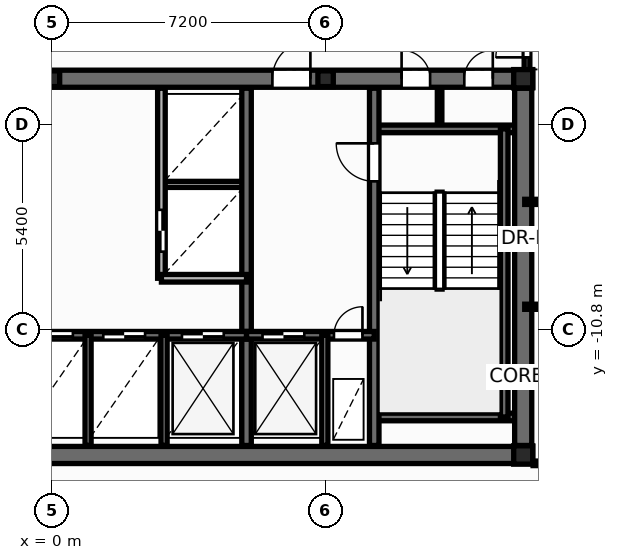
"""IFC4 building model, lengths in metres.
Left out: names, types, materials, properties, quantities, classifications, styles, units other than length and angle.
Written with IfcOpenShell. Run it as: python <this file> out.ifc"""

import sys

from ifc_helpers import new_model, si_unit, direction, frame, frame_2d, origin, origin_2d, place, context, subcontext, project, spatial, rectangle, i_section, extrude, element, fill, save


model = new_model("IFC4")
c1 = context("Model", 3, precision=1e-05, world=origin(), true_north=direction((0.0, 1.0)))
c2 = subcontext(c1, "Body", "Model", "MODEL_VIEW")
j1 = project(units=[si_unit("LENGTHUNIT", "METRE"), si_unit("PLANEANGLEUNIT", "RADIAN")], contexts=[c1])
p1 = place(None, origin())
s1 = spatial("IfcSite", under=j1, at=p1, CompositionType="ELEMENT")
p2 = place(p1, origin())
s2 = spatial("IfcBuilding", under=s1, at=p2, CompositionType="ELEMENT")
p3 = place(p2, frame((0.0, 0.0, 56.7)))
s3 = spatial("IfcBuildingStorey", under=s2, at=p3, CompositionType="ELEMENT", Elevation=56.7)
for number, where, z_axis, x_axis in (
    (1, (12.4, -14.1, 0.0), (0.0, 0.0, 1.0), (1.0, 0.0, 0.0)),
    (2, (12.4, -4.2, 0.0), (0.0, 0.0, 1.0), (1.0, 0.0, 0.0)),
):
    element("IfcColumn", number, at=place(p3, frame(where, z_axis=z_axis, x_axis=x_axis)), inside=s3, PredefinedType="COLUMN", context=c2, shape_type="SweptSolid", body=[
        extrude(i_section(OverallWidth=0.5, OverallDepth=0.482, WebThickness=0.04, FlangeThickness=0.045, at=origin_2d()), origin(), (0.0, 0.0, 1.0), 3.6),
    ])
for number, where, z_axis, x_axis in (
    (3, (0.0, -4.2, 0.0), (0.0, 0.0, 1.0), (1.0, 0.0, 0.0)),
    (4, (7.2, -4.2, 0.0), (0.0, 0.0, 1.0), (1.0, 0.0, 0.0)),
):
    element("IfcColumn", number, at=place(p3, frame(where, z_axis=z_axis, x_axis=x_axis)), inside=s3, PredefinedType="PILASTER", context=c2, shape_type="SweptSolid", body=[
        extrude(i_section(OverallWidth=0.405, OverallDepth=0.414, WebThickness=0.022, FlangeThickness=0.032, at=origin_2d()), origin(), (0.0, 0.0, 1.0), 3.6),
    ])
p4 = place(p3, frame((2.88, -6.98, 0.0), z_axis=(0.0, 0.0, 1.0), x_axis=(1.0, 0.0, 0.0)))
e5 = element("IfcWall", 5, at=p4, inside=s3, PredefinedType="PARTITIONING", context=c2, shape_type="SweptSolid", body=[
    extrude(rectangle(XDim=2.24, YDim=0.16, at=frame_2d((1.12, 0.0))), origin(), (0.0, 0.0, 1.0), 3.32),
])
p5 = place(p3, frame((10.2, -5.52, 0.0), z_axis=(0.0, 0.0, 1.0), x_axis=(0.0, 1.0, 0.0)))
e6 = element("IfcWall", 6, at=p5, inside=s3, PredefinedType="PARTITIONING", context=c2, shape_type="SweptSolid", body=[
    extrude(rectangle(XDim=1.12, YDim=0.12, at=frame_2d((0.56, 0.0))), origin(), (0.0, 0.0, 1.0), 3.32),
])
p6 = place(p3, frame((-12.65, -14.1, 0.0), z_axis=(0.0, 0.0, 1.0), x_axis=(1.0, 0.0, 0.0)))
e7 = element("IfcWall", 7, at=p6, inside=s3, PredefinedType="SHEAR", context=c2, shape_type="SweptSolid", body=[
    extrude(rectangle(XDim=25.3, YDim=0.45, at=frame_2d((12.65, 0.0))), origin(), (0.0, 0.0, 1.0), 3.6),
])
p7 = place(p3, frame((-12.65, -4.2, 0.0), z_axis=(0.0, 0.0, 1.0), x_axis=(1.0, 0.0, 0.0)))
e8 = element("IfcWall", 8, at=p7, inside=s3, PredefinedType="SHEAR", context=c2, shape_type="SweptSolid", body=[
    extrude(rectangle(XDim=25.3, YDim=0.45, at=frame_2d((12.65, 0.0))), origin(), (0.0, 0.0, 1.0), 3.6),
])
p8 = place(p7, frame((0.95, 0.0, 0.0)))
e9 = element("IfcOpeningElement", 9, at=p8, cuts=e8, PredefinedType="OPENING", context=c2, shape_type="SweptSolid", body=[
    extrude(rectangle(XDim=0.756, YDim=2.054, at=frame_2d((0.375, 1.027))), frame((0.0, 0.235, 0.0), z_axis=(0.0, -1.0, 0.0), x_axis=(1.0, 0.0, 0.0)), (0.0, 0.0, 1.0), 0.47),
])
p9 = place(p7, frame((2.6, 0.0, 0.0)))
e10 = element("IfcOpeningElement", 10, at=p9, cuts=e8, PredefinedType="OPENING", context=c2, shape_type="SweptSolid", body=[
    extrude(rectangle(XDim=0.756, YDim=2.054, at=frame_2d((0.375, 1.027))), frame((0.0, 0.235, 0.0), z_axis=(0.0, -1.0, 0.0), x_axis=(1.0, 0.0, 0.0)), (0.0, 0.0, 1.0), 0.47),
])
p10 = place(p7, frame((21.85, 0.0, 0.0)))
e11 = element("IfcOpeningElement", 11, at=p10, cuts=e8, PredefinedType="OPENING", context=c2, shape_type="SweptSolid", body=[
    extrude(rectangle(XDim=0.756, YDim=2.054, at=frame_2d((0.375, 1.027))), frame((0.0, 0.235, 0.0), z_axis=(0.0, -1.0, 0.0), x_axis=(1.0, 0.0, 0.0)), (0.0, 0.0, 1.0), 0.47),
])
p11 = place(p7, frame((23.5, 0.0, 0.0)))
e12 = element("IfcOpeningElement", 12, at=p11, cuts=e8, PredefinedType="OPENING", context=c2, shape_type="SweptSolid", body=[
    extrude(rectangle(XDim=0.756, YDim=2.054, at=frame_2d((0.375, 1.027))), frame((0.0, 0.235, 0.0), z_axis=(0.0, -1.0, 0.0), x_axis=(1.0, 0.0, 0.0)), (0.0, 0.0, 1.0), 0.47),
])
p12 = place(p7, frame((5.85, 0.0, 0.0)))
e13 = element("IfcOpeningElement", 13, at=p12, cuts=e8, PredefinedType="OPENING", context=c2, shape_type="SweptSolid", body=[
    extrude(rectangle(XDim=1.006, YDim=2.104, at=frame_2d((0.5, 1.052))), frame((0.0, 0.235, 0.0), z_axis=(0.0, -1.0, 0.0), x_axis=(1.0, 0.0, 0.0)), (0.0, 0.0, 1.0), 0.47),
])
p13 = place(p7, frame((10.35, 0.0, 0.0)))
e14 = element("IfcOpeningElement", 14, at=p13, cuts=e8, PredefinedType="OPENING", context=c2, shape_type="SweptSolid", body=[
    extrude(rectangle(XDim=1.406, YDim=2.154, at=frame_2d((0.7, 1.077))), frame((0.0, 0.235, 0.0), z_axis=(0.0, -1.0, 0.0), x_axis=(1.0, 0.0, 0.0)), (0.0, 0.0, 1.0), 0.47),
])
p14 = place(p7, frame((18.45, 0.0, 0.0)))
e15 = element("IfcOpeningElement", 15, at=p14, cuts=e8, PredefinedType="OPENING", context=c2, shape_type="SweptSolid", body=[
    extrude(rectangle(XDim=1.006, YDim=2.104, at=frame_2d((0.5, 1.052))), frame((0.0, 0.235, 0.0), z_axis=(0.0, -1.0, 0.0), x_axis=(1.0, 0.0, 0.0)), (0.0, 0.0, 1.0), 0.47),
])
for number, where, z_axis, x_axis in (
    (16, (8.48, -5.52, 0.0), (0.0, 0.0, 1.0), (1.0, 0.0, 0.0)),
    (17, (8.48, -13.1, 0.0), (0.0, 0.0, 1.0), (1.0, 0.0, 0.0)),
):
    element("IfcWall", number, at=place(p3, frame(where, z_axis=z_axis, x_axis=x_axis)), inside=s3, PredefinedType="SOLIDWALL", context=c2, shape_type="SweptSolid", body=[
        extrude(rectangle(XDim=3.87, YDim=0.2, at=frame_2d((1.935, 0.0))), origin(), (0.0, 0.0, 1.0), 3.6),
    ])
p15 = place(p3, frame((11.9, -13.1, 0.0), z_axis=(0.0, 0.0, 1.0), x_axis=(0.0, 1.0, 0.0)))
e18 = element("IfcWall", 18, at=p15, inside=s3, PredefinedType="SOLIDWALL", context=c2, shape_type="SweptSolid", body=[
    extrude(rectangle(XDim=7.58, YDim=0.2, at=frame_2d((3.79, 0.0))), origin(), (0.0, 0.0, 1.0), 3.6),
])
p16 = place(p3, frame((8.48, -13.85, 0.0), z_axis=(0.0, 0.0, 1.0), x_axis=(0.0, 1.0, 0.0)))
e19 = element("IfcWall", 19, at=p16, inside=s3, PredefinedType="SHEAR", context=c2, shape_type="SweptSolid", body=[
    extrude(rectangle(XDim=9.4, YDim=0.25, at=frame_2d((4.7, 0.0))), origin(), (0.0, 0.0, 1.0), 3.6),
])
p17 = place(p16, frame((6.95, 0.0, 0.0)))
e20 = element("IfcOpeningElement", 20, at=p17, cuts=e19, PredefinedType="OPENING", context=c2, shape_type="SweptSolid", body=[
    extrude(rectangle(XDim=1.006, YDim=2.104, at=frame_2d((0.5, 1.052))), frame((0.0, 0.135, 0.0), z_axis=(0.0, -1.0, 0.0), x_axis=(1.0, 0.0, 0.0)), (0.0, 0.0, 1.0), 0.27),
])
p18 = place(p3, frame((5.12, -13.85, 0.0), z_axis=(0.0, 0.0, 1.0), x_axis=(0.0, 1.0, 0.0)))
e21 = element("IfcWall", 21, at=p18, inside=s3, PredefinedType="SHEAR", context=c2, shape_type="SweptSolid", body=[
    extrude(rectangle(XDim=9.4, YDim=0.25, at=frame_2d((4.7, 0.0))), origin(), (0.0, 0.0, 1.0), 3.6),
])
p19 = place(p3, frame((-5.12, -10.95, 0.0), z_axis=(0.0, 0.0, 1.0), x_axis=(1.0, 0.0, 0.0)))
e22 = element("IfcWall", 22, at=p19, inside=s3, PredefinedType="SOLIDWALL", context=c2, shape_type="SweptSolid", body=[
    extrude(rectangle(XDim=10.24, YDim=0.2, at=frame_2d((5.12, 0.0))), origin(), (0.0, 0.0, 1.0), 3.6),
])
p20 = place(p19, frame((0.6, 0.0, 0.0)))
e23 = element("IfcOpeningElement", 23, at=p20, cuts=e22, PredefinedType="OPENING", context=c2, shape_type="SweptSolid", body=[
    extrude(rectangle(XDim=1.106, YDim=2.104, at=frame_2d((0.55, 1.052))), frame((0.0, 0.11, 0.0), z_axis=(0.0, -1.0, 0.0), x_axis=(1.0, 0.0, 0.0)), (0.0, 0.0, 1.0), 0.22),
])
p21 = place(p19, frame((2.67, 0.0, 0.0)))
e24 = element("IfcOpeningElement", 24, at=p21, cuts=e22, PredefinedType="OPENING", context=c2, shape_type="SweptSolid", body=[
    extrude(rectangle(XDim=1.106, YDim=2.104, at=frame_2d((0.55, 1.052))), frame((0.0, 0.11, 0.0), z_axis=(0.0, -1.0, 0.0), x_axis=(1.0, 0.0, 0.0)), (0.0, 0.0, 1.0), 0.22),
])
p22 = place(p19, frame((4.57, 0.0, 0.0)))
e25 = element("IfcOpeningElement", 25, at=p22, cuts=e22, PredefinedType="OPENING", context=c2, shape_type="SweptSolid", body=[
    extrude(rectangle(XDim=1.106, YDim=2.104, at=frame_2d((0.55, 1.052))), frame((0.0, 0.11, 0.0), z_axis=(0.0, -1.0, 0.0), x_axis=(1.0, 0.0, 0.0)), (0.0, 0.0, 1.0), 0.22),
])
p23 = place(p19, frame((6.47, 0.0, 0.0)))
e26 = element("IfcOpeningElement", 26, at=p23, cuts=e22, PredefinedType="OPENING", context=c2, shape_type="SweptSolid", body=[
    extrude(rectangle(XDim=1.106, YDim=2.104, at=frame_2d((0.55, 1.052))), frame((0.0, 0.11, 0.0), z_axis=(0.0, -1.0, 0.0), x_axis=(1.0, 0.0, 0.0)), (0.0, 0.0, 1.0), 0.22),
])
p24 = place(p19, frame((8.54, 0.0, 0.0)))
e27 = element("IfcOpeningElement", 27, at=p24, cuts=e22, PredefinedType="OPENING", context=c2, shape_type="SweptSolid", body=[
    extrude(rectangle(XDim=1.106, YDim=2.104, at=frame_2d((0.55, 1.052))), frame((0.0, 0.11, 0.0), z_axis=(0.0, -1.0, 0.0), x_axis=(1.0, 0.0, 0.0)), (0.0, 0.0, 1.0), 0.22),
])
p25 = place(p3, frame((5.12, -10.95, 0.0), z_axis=(0.0, 0.0, 1.0), x_axis=(1.0, 0.0, 0.0)))
e28 = element("IfcWall", 28, at=p25, inside=s3, PredefinedType="SOLIDWALL", context=c2, shape_type="SweptSolid", body=[
    extrude(rectangle(XDim=3.36, YDim=0.2, at=frame_2d((1.68, 0.0))), origin(), (0.0, 0.0, 1.0), 3.6),
])
p26 = place(p25, frame((0.42, 0.0, 0.0)))
e29 = element("IfcOpeningElement", 29, at=p26, cuts=e28, PredefinedType="OPENING", context=c2, shape_type="SweptSolid", body=[
    extrude(rectangle(XDim=1.106, YDim=2.104, at=frame_2d((0.55, 1.052))), frame((0.0, 0.11, 0.0), z_axis=(0.0, -1.0, 0.0), x_axis=(1.0, 0.0, 0.0)), (0.0, 0.0, 1.0), 0.22),
])
p27 = place(p25, frame((2.3, 0.0, 0.0)))
e30 = element("IfcOpeningElement", 30, at=p27, cuts=e28, PredefinedType="OPENING", context=c2, shape_type="SweptSolid", body=[
    extrude(rectangle(XDim=0.756, YDim=2.054, at=frame_2d((0.375, 1.027))), frame((0.0, 0.11, 0.0), z_axis=(0.0, -1.0, 0.0), x_axis=(1.0, 0.0, 0.0)), (0.0, 0.0, 1.0), 0.22),
])
for number, where, z_axis, x_axis in (
    (31, (7.18, -13.85, 0.0), (0.0, 0.0, 1.0), (0.0, 1.0, 0.0)),
    (32, (2.95, -13.85, 0.0), (0.0, 0.0, 1.0), (0.0, 1.0, 0.0)),
):
    element("IfcWall", number, at=place(p3, frame(where, z_axis=z_axis, x_axis=x_axis)), inside=s3, PredefinedType="PARTITIONING", context=c2, shape_type="SweptSolid", body=[
        extrude(rectangle(XDim=2.9, YDim=0.16, at=frame_2d((1.45, 0.0))), origin(), (0.0, 0.0, 1.0), 2.345),
    ])
p28 = place(p3, frame((12.4, -13.85, 0.0), z_axis=(0.0, 0.0, 1.0), x_axis=(0.0, 1.0, 0.0)))
e33 = element("IfcWall", 33, at=p28, inside=s3, PredefinedType="SHEAR", context=c2, shape_type="SweptSolid", body=[
    extrude(rectangle(XDim=9.4, YDim=0.45, at=frame_2d((4.7, 0.0))), origin(), (0.0, 0.0, 1.0), 3.6),
])
p29 = place(p3, frame((2.88, -9.45, 0.0), z_axis=(0.0, 0.0, 1.0), x_axis=(0.0, 1.0, 0.0)))
e34 = element("IfcWall", 34, at=p29, inside=s3, PredefinedType="SOLIDWALL", context=c2, shape_type="SweptSolid", body=[
    extrude(rectangle(XDim=5.0, YDim=0.2, at=frame_2d((2.5, 0.0))), origin(), (0.0, 0.0, 1.0), 3.32),
])
p30 = place(p29, frame((0.7, 0.0, 0.0)))
e35 = element("IfcOpeningElement", 35, at=p30, cuts=e34, PredefinedType="OPENING", context=c2, shape_type="SweptSolid", body=[
    extrude(rectangle(XDim=1.106, YDim=2.104, at=frame_2d((0.55, 1.052))), frame((0.0, 0.11, 0.0), z_axis=(0.0, -1.0, 0.0), x_axis=(1.0, 0.0, 0.0)), (0.0, 0.0, 1.0), 0.22),
])
p31 = place(p3, frame((2.88, -9.45, 0.0), z_axis=(0.0, 0.0, 1.0), x_axis=(1.0, 0.0, 0.0)))
e36 = element("IfcWall", 36, at=p31, inside=s3, PredefinedType="SOLIDWALL", context=c2, shape_type="SweptSolid", body=[
    extrude(rectangle(XDim=2.24, YDim=0.2, at=frame_2d((1.12, 0.0))), origin(), (0.0, 0.0, 1.0), 3.32),
])
p32 = place(p3, frame((0.95, -13.85, 0.0), z_axis=(0.0, 0.0, 1.0), x_axis=(0.0, 1.0, 0.0)))
e37 = element("IfcWall", 37, at=p32, inside=s3, PredefinedType="PARTITIONING", context=c2, shape_type="SweptSolid", body=[
    extrude(rectangle(XDim=2.9, YDim=0.16, at=frame_2d((1.45, 0.0))), origin(), (0.0, 0.0, 1.0), 2.345),
])
p33 = place(p3, frame((12.66, -14.32, 0.0), z_axis=(0.0, 0.0, 1.0), x_axis=(1.0, 0.0, 0.0)))
e38 = element("IfcWall", 38, at=p33, inside=s3, PredefinedType="PARTITIONING", context=c2, shape_type="SweptSolid", body=[
    extrude(rectangle(XDim=6.184, YDim=0.12, at=frame_2d((3.092, 0.0))), origin(), (0.0, 0.0, 1.0), 2.683),
])
p34 = place(p33, frame((1.81, 0.0, 0.0)))
e39 = element("IfcOpeningElement", 39, at=p34, cuts=e38, PredefinedType="OPENING", context=c2, shape_type="SweptSolid", body=[
    extrude(rectangle(XDim=0.926, YDim=2.104, at=frame_2d((0.46, 1.052))), frame((0.0, 0.07, 0.0), z_axis=(0.0, -1.0, 0.0), x_axis=(1.0, 0.0, 0.0)), (0.0, 0.0, 1.0), 0.14),
])
p35 = place(p3, frame((12.44, -7.44, 0.0), z_axis=(0.0, 0.0, 1.0), x_axis=(1.0, 0.0, 0.0)))
e40 = element("IfcWall", 40, at=p35, inside=s3, PredefinedType="PARTITIONING", context=c2, shape_type="SweptSolid", body=[
    extrude(rectangle(XDim=2.638, YDim=0.135, at=frame_2d((1.319, 0.0))), origin(), (0.0, 0.0, 1.0), 2.683),
])
p36 = place(p35, frame((0.458, 0.0, 0.0)))
e41 = element("IfcOpeningElement", 41, at=p36, cuts=e40, PredefinedType="OPENING", context=c2, shape_type="SweptSolid", body=[
    extrude(rectangle(XDim=0.856, YDim=2.104, at=frame_2d((0.425, 1.052))), frame((0.0, 0.078, 0.0), z_axis=(0.0, -1.0, 0.0), x_axis=(1.0, 0.0, 0.0)), (0.0, 0.0, 1.0), 0.155),
])
p37 = place(p3, frame((12.44, -10.2, 0.0), z_axis=(0.0, 0.0, 1.0), x_axis=(1.0, 0.0, 0.0)))
e42 = element("IfcWall", 42, at=p37, inside=s3, PredefinedType="PARTITIONING", context=c2, shape_type="SweptSolid", body=[
    extrude(rectangle(XDim=2.72, YDim=0.135, at=frame_2d((1.36, 0.0))), origin(), (0.0, 0.0, 1.0), 2.683),
])
p38 = place(p3, frame((12.5, -4.24, 0.0), z_axis=(0.0, 0.0, 1.0), x_axis=(0.0, 1.0, 0.0)))
e43 = element("IfcWall", 43, at=p38, inside=s3, PredefinedType="PARTITIONING", context=c2, shape_type="SweptSolid", body=[
    extrude(rectangle(XDim=1.6, YDim=0.15, at=frame_2d((0.8, 0.0))), origin(), (0.0, 0.0, 1.0), 2.295),
])
p39 = place(p38, frame((0.602, 0.0, 0.0)))
e44 = element("IfcOpeningElement", 44, at=p39, cuts=e43, PredefinedType="OPENING", context=c2, shape_type="SweptSolid", body=[
    extrude(rectangle(XDim=0.826, YDim=2.104, at=frame_2d((0.41, 1.052))), frame((0.0, 0.085, 0.0), z_axis=(0.0, -1.0, 0.0), x_axis=(1.0, 0.0, 0.0)), (0.0, 0.0, 1.0), 0.17),
])
p40 = place(p30, origin())
e45 = element("IfcDoor", 45, at=p40, inside=s3, OperationType="DOUBLE_DOOR_SLIDING", PredefinedType="DOOR", context=c2, shape_type="SweptSolid", body=[
    extrude(rectangle(XDim=1.1, YDim=2.1, at=frame_2d((0.55, 1.05))), frame((0.0, 0.025, 0.0), z_axis=(0.0, -1.0, 0.0), x_axis=(1.0, 0.0, 0.0)), (0.0, 0.0, 1.0), 0.05),
])
fill(e35, e45)
p41 = place(p17, origin())
e46 = element("IfcDoor", 46, at=p41, inside=s3, OperationType="SINGLE_SWING_RIGHT", PredefinedType="DOOR", context=c2, shape_type="SweptSolid", body=[
    extrude(rectangle(XDim=1.0, YDim=2.1, at=frame_2d((0.5, 1.05))), frame((0.0, 0.025, 0.0), z_axis=(0.0, -1.0, 0.0), x_axis=(1.0, 0.0, 0.0)), (0.0, 0.0, 1.0), 0.05),
])
fill(e20, e46)
p42 = place(p26, origin())
e47 = element("IfcDoor", 47, at=p42, inside=s3, OperationType="DOUBLE_DOOR_SLIDING", PredefinedType="DOOR", context=c2, shape_type="SweptSolid", body=[
    extrude(rectangle(XDim=1.1, YDim=2.1, at=frame_2d((0.55, 1.05))), frame((0.0, 0.025, 0.0), z_axis=(0.0, -1.0, 0.0), x_axis=(1.0, 0.0, 0.0)), (0.0, 0.0, 1.0), 0.05),
])
fill(e29, e47)
p43 = place(p27, origin())
e48 = element("IfcDoor", 48, at=p43, inside=s3, OperationType="SINGLE_SWING_RIGHT", PredefinedType="DOOR", context=c2, shape_type="SweptSolid", body=[
    extrude(rectangle(XDim=0.75, YDim=2.05, at=frame_2d((0.375, 1.025))), frame((0.0, 0.025, 0.0), z_axis=(0.0, -1.0, 0.0), x_axis=(1.0, 0.0, 0.0)), (0.0, 0.0, 1.0), 0.05),
])
fill(e30, e48)
p44 = place(p22, origin())
e49 = element("IfcDoor", 49, at=p44, inside=s3, OperationType="DOUBLE_DOOR_SLIDING", PredefinedType="DOOR", context=c2, shape_type="SweptSolid", body=[
    extrude(rectangle(XDim=1.1, YDim=2.1, at=frame_2d((0.55, 1.05))), frame((0.0, 0.025, 0.0), z_axis=(0.0, -1.0, 0.0), x_axis=(1.0, 0.0, 0.0)), (0.0, 0.0, 1.0), 0.05),
])
fill(e25, e49)
p45 = place(p23, origin())
e50 = element("IfcDoor", 50, at=p45, inside=s3, OperationType="DOUBLE_DOOR_SLIDING", PredefinedType="DOOR", context=c2, shape_type="SweptSolid", body=[
    extrude(rectangle(XDim=1.1, YDim=2.1, at=frame_2d((0.55, 1.05))), frame((0.0, 0.025, 0.0), z_axis=(0.0, -1.0, 0.0), x_axis=(1.0, 0.0, 0.0)), (0.0, 0.0, 1.0), 0.05),
])
fill(e26, e50)
p46 = place(p24, origin())
e51 = element("IfcDoor", 51, at=p46, inside=s3, OperationType="DOUBLE_DOOR_SLIDING", PredefinedType="DOOR", context=c2, shape_type="SweptSolid", body=[
    extrude(rectangle(XDim=1.1, YDim=2.1, at=frame_2d((0.55, 1.05))), frame((0.0, 0.025, 0.0), z_axis=(0.0, -1.0, 0.0), x_axis=(1.0, 0.0, 0.0)), (0.0, 0.0, 1.0), 0.05),
])
fill(e27, e51)
p47 = place(p10, origin())
e52 = element("IfcDoor", 52, at=p47, inside=s3, OperationType="SINGLE_SWING_LEFT", PredefinedType="DOOR", context=c2, shape_type="SweptSolid", body=[
    extrude(rectangle(XDim=0.75, YDim=2.05, at=frame_2d((0.375, 1.025))), frame((0.0, 0.025, 0.0), z_axis=(0.0, -1.0, 0.0), x_axis=(1.0, 0.0, 0.0)), (0.0, 0.0, 1.0), 0.05),
])
fill(e11, e52)
p48 = place(p11, origin())
e53 = element("IfcDoor", 53, at=p48, inside=s3, OperationType="SINGLE_SWING_RIGHT", PredefinedType="DOOR", context=c2, shape_type="SweptSolid", body=[
    extrude(rectangle(XDim=0.75, YDim=2.05, at=frame_2d((0.375, 1.025))), frame((0.0, 0.025, 0.0), z_axis=(0.0, -1.0, 0.0), x_axis=(1.0, 0.0, 0.0)), (0.0, 0.0, 1.0), 0.05),
])
fill(e12, e53)
p49 = place(p14, origin())
e54 = element("IfcDoor", 54, at=p49, inside=s3, OperationType="SINGLE_SWING_RIGHT", PredefinedType="DOOR", context=c2, shape_type="SweptSolid", body=[
    extrude(rectangle(XDim=1.0, YDim=2.1, at=frame_2d((0.5, 1.05))), frame((0.0, 0.025, 0.0), z_axis=(0.0, -1.0, 0.0), x_axis=(1.0, 0.0, 0.0)), (0.0, 0.0, 1.0), 0.05),
])
fill(e15, e54)
p50 = place(p39, origin())
e55 = element("IfcDoor", 55, at=p50, inside=s3, OperationType="SINGLE_SWING_LEFT", PredefinedType="DOOR", context=c2, shape_type="SweptSolid", body=[
    extrude(rectangle(XDim=0.82, YDim=2.1, at=frame_2d((0.41, 1.05))), frame((0.0, 0.025, 0.0), z_axis=(0.0, -1.0, 0.0), x_axis=(1.0, 0.0, 0.0)), (0.0, 0.0, 1.0), 0.05),
])
fill(e44, e55)
save(model, sys.argv[1])
